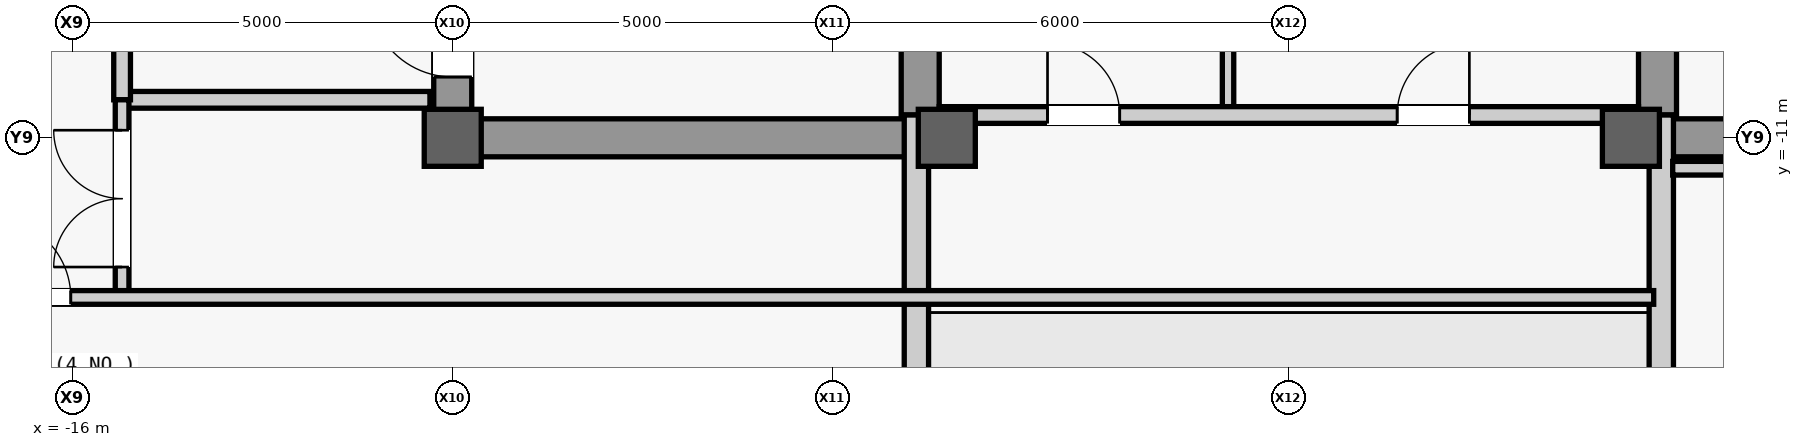
"""IFC4 building model, lengths in metres.
Left out: names, types, materials, properties, quantities, classifications, styles, units other than length and angle.
Written with IfcOpenShell. Run it as: python <this file> out.ifc"""

import sys

from ifc_helpers import new_model, si_unit, direction, frame, frame_2d, origin, origin_2d, place, context, subcontext, project, spatial, rectangle, extrude, source, transform, mapped, element, fill, save


model = new_model("IFC4")
c1 = context("Model", 3, precision=1e-05, world=origin(), true_north=direction((0.0, 1.0)))
c2 = subcontext(c1, "Body", "Model", "MODEL_VIEW")
j1 = project(units=[si_unit("LENGTHUNIT", "METRE"), si_unit("PLANEANGLEUNIT", "RADIAN")], contexts=[c1])
p1 = place(None, origin())
s1 = spatial("IfcSite", under=j1, at=p1, CompositionType="ELEMENT")
p2 = place(p1, origin())
s2 = spatial("IfcBuilding", under=s1, at=p2, CompositionType="ELEMENT")
p3 = place(p2, frame((0.0, 0.0, 346.3)))
s3 = spatial("IfcBuildingStorey", under=s2, at=p3, CompositionType="ELEMENT", Elevation=346.3)
m1 = source(origin(), c2, "Body", "SweptSolid", [
    extrude(rectangle(XDim=22.0, YDim=0.5, at=frame_2d((11.0, 0.0))), origin(), (0.0, 0.0, 1.0), 3.74),
])
p4 = place(p3, frame((-11.0, -11.0, 0.0), z_axis=(0.0, 0.0, 1.0), x_axis=(0.0, 1.0, 0.0)))
e1 = element("IfcWall", 1, at=p4, inside=s3, PredefinedType="SHEAR", context=c2, shape_type="MappedRepresentation", body=[
    mapped(m1, transform((0.0, 0.0, 0.0), scale=1.0)),
])
m2 = source(origin(), c2, "Body", "SweptSolid", [
    extrude(rectangle(XDim=1.1, YDim=2.2, at=frame_2d((0.55, 1.1))), frame((0.0, 0.26, 0.0), z_axis=(0.0, -1.0, 0.0), x_axis=(1.0, 0.0, 0.0)), (0.0, 0.0, 1.0), 0.52),
])
p5 = place(p4, frame((0.8, 0.0, 0.0)))
e2 = element("IfcOpeningElement", 2, at=p5, cuts=e1, PredefinedType="OPENING", context=c2, shape_type="MappedRepresentation", body=[
    mapped(m2, transform((0.0, 0.0, 0.0), scale=1.0)),
])
p6 = place(p4, frame((12.5, 0.0, 0.0)))
e3 = element("IfcOpeningElement", 3, at=p6, cuts=e1, PredefinedType="OPENING", context=c2, shape_type="MappedRepresentation", body=[
    mapped(m2, transform((0.0, 0.0, 0.0), scale=1.0)),
])
m3 = source(origin(), c2, "Body", "SweptSolid", [
    extrude(rectangle(XDim=0.9, YDim=2.15, at=frame_2d((0.45, 1.075))), frame((0.0, 0.26, 0.0), z_axis=(0.0, -1.0, 0.0), x_axis=(1.0, 0.0, 0.0)), (0.0, 0.0, 1.0), 0.52),
])
p7 = place(p4, frame((6.85, 0.0, 0.0)))
e4 = element("IfcOpeningElement", 4, at=p7, cuts=e1, PredefinedType="OPENING", context=c2, shape_type="MappedRepresentation", body=[
    mapped(m3, transform((0.0, 0.0, 0.0), scale=1.0)),
])
m4 = source(origin(), c2, "Body", "SweptSolid", [
    extrude(rectangle(XDim=1.2, YDim=2.3, at=frame_2d((0.6, 1.15))), frame((0.0, 0.26, 0.0), z_axis=(0.0, -1.0, 0.0), x_axis=(1.0, 0.0, 0.0)), (0.0, 0.0, 1.0), 0.52),
])
p8 = place(p4, frame((14.6, 0.0, 0.0)))
e5 = element("IfcOpeningElement", 5, at=p8, cuts=e1, PredefinedType="OPENING", context=c2, shape_type="MappedRepresentation", body=[
    mapped(m4, transform((0.0, 0.0, 0.0), scale=1.0)),
])
p9 = place(p4, frame((18.2, 0.0, 0.0)))
e6 = element("IfcOpeningElement", 6, at=p9, cuts=e1, PredefinedType="OPENING", context=c2, shape_type="MappedRepresentation", body=[
    mapped(m4, transform((0.0, 0.0, 0.0), scale=1.0)),
])
m5 = source(origin(), c2, "Body", "SweptSolid", [
    extrude(rectangle(XDim=1.3, YDim=2.3, at=frame_2d((0.65, 1.15))), frame((0.0, 0.26, 0.0), z_axis=(0.0, -1.0, 0.0), x_axis=(1.0, 0.0, 0.0)), (0.0, 0.0, 1.0), 0.52),
])
p10 = place(p4, frame((2.7, 0.0, 0.0)))
e7 = element("IfcOpeningElement", 7, at=p10, cuts=e1, PredefinedType="OPENING", context=c2, shape_type="MappedRepresentation", body=[
    mapped(m5, transform((0.0, 0.0, 0.0), scale=1.0)),
])
m6 = source(origin(), c2, "Body", "SweptSolid", [
    extrude(rectangle(XDim=21.4, YDim=0.5, at=frame_2d((10.7, 0.0))), origin(), (0.0, 0.0, 1.0), 3.74),
])
for number, where, z_axis, x_axis in (
    (8, (-4.85, -10.7, 0.0), (0.0, 0.0, 1.0), (0.0, 1.0, 0.0)),
    (9, (4.85, -10.7, 0.0), (0.0, 0.0, 1.0), (0.0, 1.0, 0.0)),
):
    element("IfcWall", number, at=place(p3, frame(where, z_axis=z_axis, x_axis=x_axis)), inside=s3, PredefinedType="SHEAR", context=c2, shape_type="MappedRepresentation", body=[
        mapped(m6, transform((0.0, 0.0, 0.0), scale=1.0)),
    ])
m7 = source(origin(), c2, "Body", "SweptSolid", [
    extrude(rectangle(XDim=5.9, YDim=0.5, at=frame_2d((2.95, 0.0))), origin(), (0.0, 0.0, 1.0), 3.74),
])
for number, where, z_axis, x_axis in (
    (10, (-10.75, -11.0, 0.0), (0.0, 0.0, 1.0), (1.0, 0.0, 0.0)),
    (11, (4.85, -11.0, 0.0), (0.0, 0.0, 1.0), (1.0, 0.0, 0.0)),
):
    element("IfcWall", number, at=place(p3, frame(where, z_axis=z_axis, x_axis=x_axis)), inside=s3, PredefinedType="SHEAR", context=c2, shape_type="MappedRepresentation", body=[
        mapped(m7, transform((0.0, 0.0, 0.0), scale=1.0)),
    ])
m8 = source(origin(), c2, "Body", "SweptSolid", [
    extrude(rectangle(XDim=0.75, YDim=0.75, at=origin_2d()), origin(), (0.0, 0.0, 1.0), 4.0),
])
for number, where, z_axis, x_axis in (
    (12, (-11.0, -11.0, 0.0), (0.0, 0.0, 1.0), (1.0, 0.0, 0.0)),
    (13, (-4.5, -11.0, 0.0), (0.0, 0.0, 1.0), (1.0, 0.0, 0.0)),
    (14, (4.5, -11.0, 0.0), (0.0, 0.0, 1.0), (1.0, 0.0, 0.0)),
):
    element("IfcColumn", number, at=place(p3, frame(where, z_axis=z_axis, x_axis=x_axis)), inside=s3, PredefinedType="COLUMN", context=c2, shape_type="MappedRepresentation", body=[
        mapped(m8, transform((0.0, 0.0, 0.0), scale=1.0)),
    ])
m9 = source(origin(), c2, "Body", "SweptSolid", [
    extrude(rectangle(XDim=14.98, YDim=0.32, at=frame_2d((7.49, 0.0))), origin(), (0.0, 0.0, 1.0), 3.045),
])
for number, where, z_axis, x_axis in (
    (15, (-4.9, -25.68, 0.0), (0.0, 0.0, 1.0), (0.0, 1.0, 0.0)),
    (16, (4.9, -25.68, 0.0), (0.0, 0.0, 1.0), (0.0, 1.0, 0.0)),
):
    element("IfcWall", number, at=place(p3, frame(where, z_axis=z_axis, x_axis=x_axis)), inside=s3, PredefinedType="STANDARD", context=c2, shape_type="MappedRepresentation", body=[
        mapped(m9, transform((0.0, 0.0, 0.0), scale=1.0)),
    ])
m10 = source(origin(), c2, "Body", "SweptSolid", [
    extrude(rectangle(XDim=4.05, YDim=0.22, at=frame_2d((2.025, 0.0))), origin(), (0.0, 0.0, 1.0), 3.74),
])
p11 = place(p3, frame((-15.35, -10.5, 0.0), z_axis=(0.0, 0.0, 1.0), x_axis=(1.0, 0.0, 0.0)))
e17 = element("IfcWall", 17, at=p11, inside=s3, PredefinedType="PARTITIONING", context=c2, shape_type="MappedRepresentation", body=[
    mapped(m10, transform((0.0, 0.0, 0.0), scale=1.0)),
])
m11 = source(origin(), c2, "Body", "SweptSolid", [
    extrude(rectangle(XDim=4.4, YDim=0.22, at=frame_2d((2.2, 0.0))), origin(), (0.0, 0.0, 1.0), 3.74),
])
p12 = place(p3, frame((-15.35, -10.5, 0.0), z_axis=(0.0, 0.0, 1.0), x_axis=(0.0, 1.0, 0.0)))
e18 = element("IfcWall", 18, at=p12, inside=s3, PredefinedType="PARTITIONING", context=c2, shape_type="MappedRepresentation", body=[
    mapped(m11, transform((0.0, 0.0, 0.0), scale=1.0)),
])
m12 = source(origin(), c2, "Body", "SweptSolid", [
    extrude(rectangle(XDim=1.2, YDim=2.2, at=frame_2d((0.6, 1.1))), frame((0.0, 0.12, 0.0), z_axis=(0.0, -1.0, 0.0), x_axis=(1.0, 0.0, 0.0)), (0.0, 0.0, 1.0), 0.24),
])
p13 = place(p12, frame((1.6, 0.0, 0.0)))
e19 = element("IfcOpeningElement", 19, at=p13, cuts=e18, PredefinedType="OPENING", context=c2, shape_type="MappedRepresentation", body=[
    mapped(m12, transform((0.0, 0.0, 0.0), scale=1.0)),
])
m13 = source(origin(), c2, "Body", "SweptSolid", [
    extrude(rectangle(XDim=5.4, YDim=0.15, at=frame_2d((2.7, 0.0))), origin(), (0.0, 0.0, 1.0), 3.74),
])
p14 = place(p3, frame((-0.8, -10.7, 0.0), z_axis=(0.0, 0.0, 1.0), x_axis=(0.0, 1.0, 0.0)))
e20 = element("IfcWall", 20, at=p14, inside=s3, PredefinedType="PARTITIONING", context=c2, shape_type="MappedRepresentation", body=[
    mapped(m13, transform((0.0, 0.0, 0.0), scale=1.0)),
])
m14 = source(origin(), c2, "Body", "SweptSolid", [
    extrude(rectangle(XDim=9.2, YDim=0.22, at=frame_2d((4.6, 0.0))), origin(), (0.0, 0.0, 1.0), 3.74),
])
p15 = place(p3, frame((-4.6, -10.7, 0.0), z_axis=(0.0, 0.0, 1.0), x_axis=(1.0, 0.0, 0.0)))
e21 = element("IfcWall", 21, at=p15, inside=s3, PredefinedType="PARTITIONING", context=c2, shape_type="MappedRepresentation", body=[
    mapped(m14, transform((0.0, 0.0, 0.0), scale=1.0)),
])
m15 = source(origin(), c2, "Body", "SweptSolid", [
    extrude(rectangle(XDim=0.95, YDim=2.15, at=frame_2d((0.475, 1.075))), frame((0.0, 0.12, 0.0), z_axis=(0.0, -1.0, 0.0), x_axis=(1.0, 0.0, 0.0)), (0.0, 0.0, 1.0), 0.24),
])
p16 = place(p15, frame((1.425, 0.0, 0.0)))
e22 = element("IfcOpeningElement", 22, at=p16, cuts=e21, PredefinedType="OPENING", context=c2, shape_type="MappedRepresentation", body=[
    mapped(m15, transform((0.0, 0.0, 0.0), scale=1.0)),
])
p17 = place(p15, frame((6.025, 0.0, 0.0)))
e23 = element("IfcOpeningElement", 23, at=p17, cuts=e21, PredefinedType="OPENING", context=c2, shape_type="MappedRepresentation", body=[
    mapped(m15, transform((0.0, 0.0, 0.0), scale=1.0)),
])
m16 = source(origin(), c2, "Body", "SweptSolid", [
    extrude(rectangle(XDim=2.6, YDim=0.18, at=frame_2d((1.3, 0.0))), origin(), (0.0, 0.0, 1.0), 3.74),
])
p18 = place(p3, frame((-15.35, -13.1, 0.0), z_axis=(0.0, 0.0, 1.0), x_axis=(0.0, 1.0, 0.0)))
e24 = element("IfcWall", 24, at=p18, inside=s3, PredefinedType="PARTITIONING", context=c2, shape_type="MappedRepresentation", body=[
    mapped(m16, transform((0.0, 0.0, 0.0), scale=1.0)),
])
m17 = source(origin(), c2, "Body", "SweptSolid", [
    extrude(rectangle(XDim=1.8, YDim=2.25, at=frame_2d((0.9, 1.125))), frame((0.0, 0.1, 0.0), z_axis=(0.0, -1.0, 0.0), x_axis=(1.0, 0.0, 0.0)), (0.0, 0.0, 1.0), 0.2),
])
p19 = place(p18, frame((0.4, 0.0, 0.0)))
e25 = element("IfcOpeningElement", 25, at=p19, cuts=e24, PredefinedType="OPENING", context=c2, shape_type="MappedRepresentation", body=[
    mapped(m17, transform((0.0, 0.0, 0.0), scale=1.0)),
])
m18 = source(origin(), c2, "Body", "SweptSolid", [
    extrude(rectangle(XDim=22.55, YDim=0.18, at=frame_2d((11.275, 0.0))), origin(), (0.0, 0.0, 1.0), 3.74),
])
p20 = place(p3, frame((-17.75, -13.1, 0.0), z_axis=(0.0, 0.0, 1.0), x_axis=(1.0, 0.0, 0.0)))
e26 = element("IfcWall", 26, at=p20, inside=s3, PredefinedType="PARTITIONING", context=c2, shape_type="MappedRepresentation", body=[
    mapped(m18, transform((0.0, 0.0, 0.0), scale=1.0)),
])
m19 = source(origin(), c2, "Body", "SweptSolid", [
    extrude(rectangle(XDim=1.05, YDim=2.2, at=frame_2d((0.525, 1.1))), frame((0.0, 0.1, 0.0), z_axis=(0.0, -1.0, 0.0), x_axis=(1.0, 0.0, 0.0)), (0.0, 0.0, 1.0), 0.2),
])
p21 = place(p20, frame((0.675, 0.0, 0.0)))
e27 = element("IfcOpeningElement", 27, at=p21, cuts=e26, PredefinedType="OPENING", context=c2, shape_type="MappedRepresentation", body=[
    mapped(m19, transform((0.0, 0.0, 0.0), scale=1.0)),
])
m20 = source(origin(), c2, "Body", "SweptSolid", [
    extrude(rectangle(XDim=12.7, YDim=0.18, at=frame_2d((6.35, 0.0))), origin(), (0.0, 0.0, 1.0), 2.79),
])
p22 = place(p3, frame((5.05, -11.4, 0.0), z_axis=(0.0, 0.0, 1.0), x_axis=(1.0, 0.0, 0.0)))
e28 = element("IfcWall", 28, at=p22, inside=s3, PredefinedType="PARTITIONING", context=c2, shape_type="MappedRepresentation", body=[
    mapped(m20, transform((0.0, 0.0, 0.0), scale=1.0)),
])
p23 = place(p22, frame((10.975, 0.0, 0.0)))
e29 = element("IfcOpeningElement", 29, at=p23, cuts=e28, PredefinedType="OPENING", context=c2, shape_type="MappedRepresentation", body=[
    mapped(m19, transform((0.0, 0.0, 0.0), scale=1.0)),
])
m21 = source(origin(), c2, "Body", "SweptSolid", [
    extrude(rectangle(XDim=1.1, YDim=2.2, at=frame_2d((0.55, 1.1))), frame((0.0, 0.025, 0.0), z_axis=(0.0, -1.0, 0.0), x_axis=(1.0, 0.0, 0.0)), (0.0, 0.0, 1.0), 0.05),
])
p24 = place(p5, origin())
e30 = element("IfcDoor", 30, at=p24, inside=s3, OperationType="SINGLE_SWING_RIGHT", PredefinedType="DOOR", context=c2, shape_type="MappedRepresentation", body=[
    mapped(m21, transform((0.0, 0.0, 0.0), scale=1.0)),
])
fill(e2, e30)
m22 = source(origin(), c2, "Body", "SweptSolid", [
    extrude(rectangle(XDim=0.95, YDim=2.15, at=frame_2d((0.475, 1.075))), frame((0.0, 0.025, 0.0), z_axis=(0.0, -1.0, 0.0), x_axis=(1.0, 0.0, 0.0)), (0.0, 0.0, 1.0), 0.05),
])
p25 = place(p16, origin())
e31 = element("IfcDoor", 31, at=p25, inside=s3, OperationType="SINGLE_SWING_LEFT", PredefinedType="DOOR", context=c2, shape_type="MappedRepresentation", body=[
    mapped(m22, transform((0.0, 0.0, 0.0), scale=1.0)),
])
fill(e22, e31)
p26 = place(p17, origin())
e32 = element("IfcDoor", 32, at=p26, inside=s3, OperationType="SINGLE_SWING_RIGHT", PredefinedType="DOOR", context=c2, shape_type="MappedRepresentation", body=[
    mapped(m22, transform((0.0, 0.0, 0.0), scale=1.0)),
])
fill(e23, e32)
m23 = source(origin(), c2, "Body", "SweptSolid", [
    extrude(rectangle(XDim=1.8, YDim=2.25, at=frame_2d((0.9, 1.125))), frame((0.0, 0.025, 0.0), z_axis=(0.0, -1.0, 0.0), x_axis=(1.0, 0.0, 0.0)), (0.0, 0.0, 1.0), 0.05),
])
p27 = place(p19, origin())
e33 = element("IfcDoor", 33, at=p27, inside=s3, OperationType="DOUBLE_DOOR_SINGLE_SWING", PredefinedType="DOOR", context=c2, shape_type="MappedRepresentation", body=[
    mapped(m23, transform((0.0, 0.0, 0.0), scale=1.0)),
])
fill(e25, e33)
m24 = source(origin(), c2, "Body", "SweptSolid", [
    extrude(rectangle(XDim=1.05, YDim=2.2, at=frame_2d((0.525, 1.1))), frame((0.0, 0.025, 0.0), z_axis=(0.0, -1.0, 0.0), x_axis=(1.0, 0.0, 0.0)), (0.0, 0.0, 1.0), 0.05),
])
p28 = place(p21, origin())
e34 = element("IfcDoor", 34, at=p28, inside=s3, OperationType="SINGLE_SWING_LEFT", PredefinedType="DOOR", context=c2, shape_type="MappedRepresentation", body=[
    mapped(m24, transform((0.0, 0.0, 0.0), scale=1.0)),
])
fill(e27, e34)
save(model, sys.argv[1])
